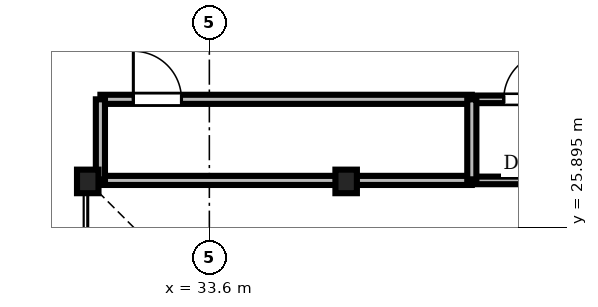
"""IFC4 building model, lengths in metres.
Left out: names, types, materials, properties, quantities, classifications, styles, units other than length and angle.
Written with IfcOpenShell. Run it as: python <this file> out.ifc"""

import sys

from ifc_helpers import new_model, si_unit, direction, frame, frame_2d, origin, origin_2d, place, context, subcontext, project, spatial, rectangle, i_section, extrude, source, transform, mapped, element, fill, save


model = new_model("IFC4")
c1 = context("Model", 3, precision=1e-05, world=origin(), true_north=direction((0.0, 1.0)))
c2 = subcontext(c1, "Body", "Model", "MODEL_VIEW")
j1 = project(units=[si_unit("LENGTHUNIT", "METRE"), si_unit("PLANEANGLEUNIT", "RADIAN")], contexts=[c1])
p1 = place(None, origin())
s1 = spatial("IfcSite", under=j1, at=p1, CompositionType="ELEMENT")
p2 = place(p1, origin())
s2 = spatial("IfcBuilding", under=s1, at=p2, CompositionType="ELEMENT")
p3 = place(p2, frame((0.0, 0.0, 129.8)))
s3 = spatial("IfcBuildingStorey", under=s2, at=p3, CompositionType="ELEMENT", Elevation=129.8)
m1 = source(origin(), c2, "Body", "SweptSolid", [
    extrude(i_section(OverallWidth=0.424, OverallDepth=0.465, WebThickness=0.035, FlangeThickness=0.056, FilletRadius=0.015, at=origin_2d()), origin(), (0.0, 0.0, 1.0), 3.46),
])
for number, where, z_axis, x_axis in (
    (1, (36.3, 26.8, 0.0), (0.0, 0.0, 1.0), (1.0, 0.0, 0.0)),
    (2, (31.2, 26.8, 0.0), (0.0, 0.0, 1.0), (1.0, 0.0, 0.0)),
):
    element("IfcColumn", number, at=place(p3, frame(where, z_axis=z_axis, x_axis=x_axis)), inside=s3, PredefinedType="COLUMN", context=c2, shape_type="MappedRepresentation", body=[
        mapped(m1, transform((0.0, 0.0, 0.0), scale=1.0)),
    ])
m2 = source(origin(), c2, "Body", "SweptSolid", [
    extrude(rectangle(XDim=7.33, YDim=0.18, at=frame_2d((3.665, 0.0))), origin(), (0.0, 0.0, 1.0), 3.092),
])
p4 = place(p3, frame((31.45, 28.42, 0.0), z_axis=(0.0, 0.0, 1.0), x_axis=(1.0, 0.0, 0.0)))
e3 = element("IfcWall", 3, at=p4, inside=s3, PredefinedType="PARTITIONING", context=c2, shape_type="MappedRepresentation", body=[
    mapped(m2, transform((0.0, 0.0, 0.0), scale=1.0)),
])
m3 = source(origin(), c2, "Body", "SweptSolid", [
    extrude(rectangle(XDim=0.95, YDim=2.15, at=frame_2d((0.475, 1.075))), frame((0.0, 0.1, 0.0), z_axis=(0.0, -1.0, 0.0), x_axis=(1.0, 0.0, 0.0)), (0.0, 0.0, 1.0), 0.2),
])
p5 = place(p4, frame((0.65, 0.0, 0.0)))
e4 = element("IfcOpeningElement", 4, at=p5, cuts=e3, PredefinedType="OPENING", context=c2, shape_type="MappedRepresentation", body=[
    mapped(m3, transform((0.0, 0.0, 0.0), scale=1.0)),
])
m4 = source(origin(), c2, "Body", "SweptSolid", [
    extrude(rectangle(XDim=2.74, YDim=0.15, at=frame_2d((1.37, 0.0))), origin(), (0.0, 0.0, 1.0), 3.46),
])
p6 = place(p3, frame((38.78, 28.42, 0.0), z_axis=(0.0, 0.0, 1.0), x_axis=(1.0, 0.0, 0.0)))
e5 = element("IfcWall", 5, at=p6, inside=s3, PredefinedType="PARTITIONING", context=c2, shape_type="MappedRepresentation", body=[
    mapped(m4, transform((0.0, 0.0, 0.0), scale=1.0)),
])
m5 = source(origin(), c2, "Body", "SweptSolid", [
    extrude(rectangle(XDim=0.92, YDim=2.1, at=frame_2d((0.46, 1.05))), frame((0.0, 0.085, 0.0), z_axis=(0.0, -1.0, 0.0), x_axis=(1.0, 0.0, 0.0)), (0.0, 0.0, 1.0), 0.17),
])
p7 = place(p6, frame((0.63, 0.0, 0.0)))
e6 = element("IfcOpeningElement", 6, at=p7, cuts=e5, PredefinedType="OPENING", context=c2, shape_type="MappedRepresentation", body=[
    mapped(m5, transform((0.0, 0.0, 0.0), scale=1.0)),
])
m6 = source(origin(), c2, "Body", "SweptSolid", [
    extrude(rectangle(XDim=7.33, YDim=0.18, at=frame_2d((3.665, 0.0))), origin(), (0.0, 0.0, 1.0), 3.002),
])
p8 = place(p3, frame((31.45, 26.82, 0.0), z_axis=(0.0, 0.0, 1.0), x_axis=(1.0, 0.0, 0.0)))
e7 = element("IfcWall", 7, at=p8, inside=s3, PredefinedType="PARTITIONING", context=c2, shape_type="MappedRepresentation", body=[
    mapped(m6, transform((0.0, 0.0, 0.0), scale=1.0)),
])
m7 = source(origin(), c2, "Body", "SweptSolid", [
    extrude(rectangle(XDim=2.74, YDim=0.15, at=frame_2d((1.37, 0.0))), origin(), (0.0, 0.0, 1.0), 2.852),
])
p9 = place(p3, frame((38.78, 26.82, 0.0), z_axis=(0.0, 0.0, 1.0), x_axis=(1.0, 0.0, 0.0)))
e8 = element("IfcWall", 8, at=p9, inside=s3, PredefinedType="PARTITIONING", context=c2, shape_type="MappedRepresentation", body=[
    mapped(m7, transform((0.0, 0.0, 0.0), scale=1.0)),
])
m8 = source(origin(), c2, "Body", "SweptSolid", [
    extrude(rectangle(XDim=1.6, YDim=0.18, at=frame_2d((0.8, 0.0))), origin(), (0.0, 0.0, 1.0), 3.002),
])
for number, where, z_axis, x_axis in (
    (9, (31.45, 26.82, 0.0), (0.0, 0.0, 1.0), (0.0, 1.0, 0.0)),
    (10, (38.78, 26.82, 0.0), (0.0, 0.0, 1.0), (0.0, 1.0, 0.0)),
):
    element("IfcWall", number, at=place(p3, frame(where, z_axis=z_axis, x_axis=x_axis)), inside=s3, PredefinedType="PARTITIONING", context=c2, shape_type="MappedRepresentation", body=[
        mapped(m8, transform((0.0, 0.0, 0.0), scale=1.0)),
    ])
m9 = source(origin(), c2, "Body", "SweptSolid", [
    extrude(rectangle(XDim=0.95, YDim=2.15, at=frame_2d((0.475, 1.075))), frame((0.0, 0.025, 0.0), z_axis=(0.0, -1.0, 0.0), x_axis=(1.0, 0.0, 0.0)), (0.0, 0.0, 1.0), 0.05),
])
p10 = place(p5, origin())
e11 = element("IfcDoor", 11, at=p10, inside=s3, OperationType="SINGLE_SWING_LEFT", PredefinedType="DOOR", context=c2, shape_type="MappedRepresentation", body=[
    mapped(m9, transform((0.0, 0.0, 0.0), scale=1.0)),
])
fill(e4, e11)
m10 = source(origin(), c2, "Body", "SweptSolid", [
    extrude(rectangle(XDim=0.92, YDim=2.1, at=frame_2d((0.46, 1.05))), frame((0.0, 0.025, 0.0), z_axis=(0.0, -1.0, 0.0), x_axis=(1.0, 0.0, 0.0)), (0.0, 0.0, 1.0), 0.05),
])
p11 = place(p7, origin())
e12 = element("IfcDoor", 12, at=p11, inside=s3, OperationType="SINGLE_SWING_RIGHT", PredefinedType="DOOR", context=c2, shape_type="MappedRepresentation", body=[
    mapped(m10, transform((0.0, 0.0, 0.0), scale=1.0)),
])
fill(e6, e12)
save(model, sys.argv[1])
